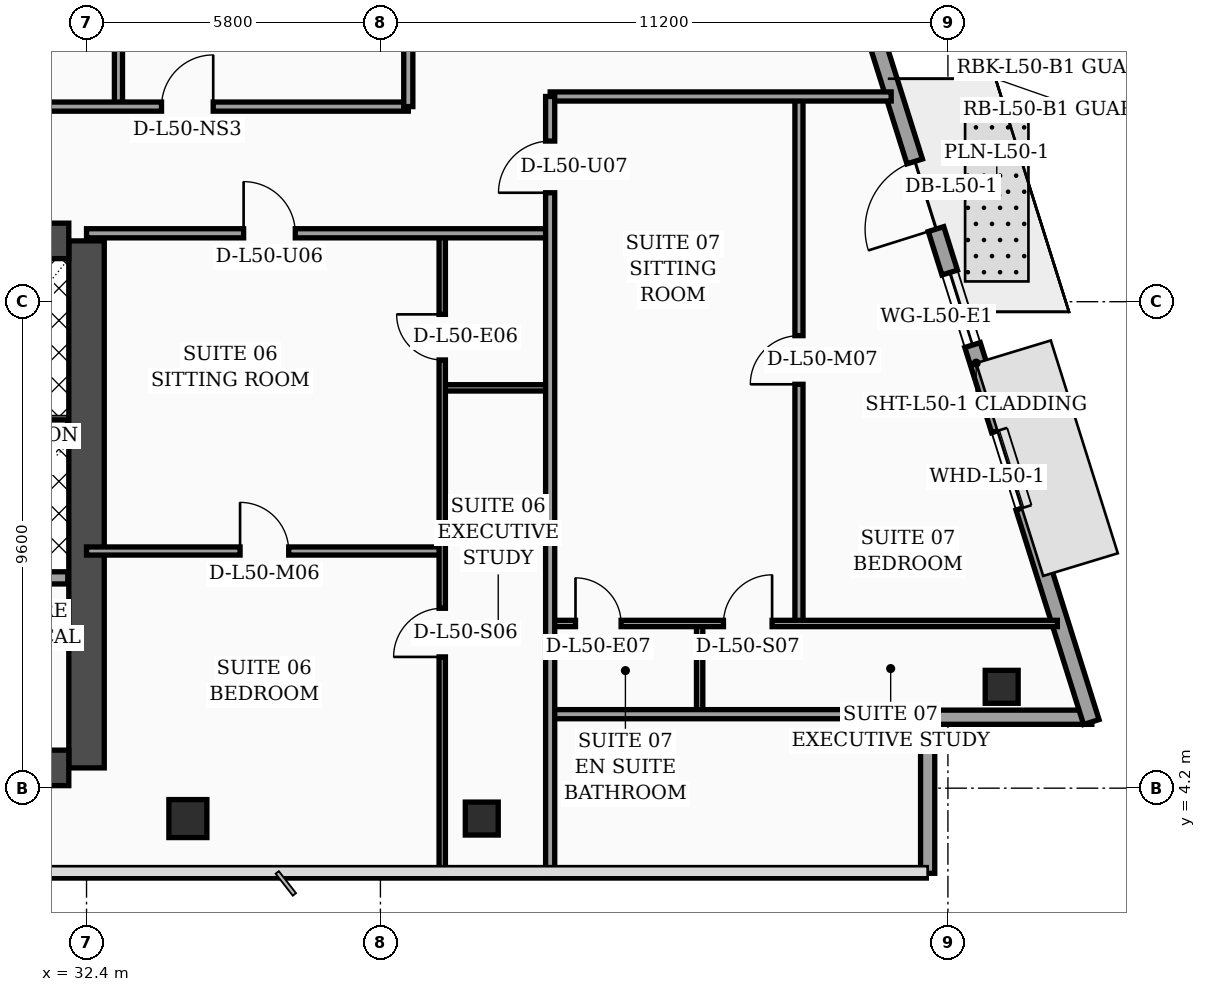
"""IFC4 building model, lengths in metres.
Left out: names, types, materials, properties, quantities, classifications, styles, units other than length and angle.
Written with IfcOpenShell. Run it as: python <this file> out.ifc"""

import sys

from ifc_helpers import new_model, si_unit, direction, frame, frame_2d, origin, origin_2d, place, context, subcontext, project, spatial, rectangle, hollow_rectangle, extrude, element, fill, save


model = new_model("IFC4")
c1 = context("Model", 3, precision=1e-05, world=origin(), true_north=direction((0.0, 1.0)))
c2 = subcontext(c1, "Body", "Model", "MODEL_VIEW")
j1 = project(units=[si_unit("LENGTHUNIT", "METRE"), si_unit("PLANEANGLEUNIT", "RADIAN")], contexts=[c1])
p1 = place(None, origin())
s1 = spatial("IfcSite", under=j1, at=p1, CompositionType="ELEMENT")
p2 = place(p1, origin())
s2 = spatial("IfcBuilding", under=s1, at=p2, CompositionType="ELEMENT")
p3 = place(p2, frame((0.0, 0.0, 203.4)))
s3 = spatial("IfcBuildingStorey", under=s2, at=p3, CompositionType="ELEMENT", Elevation=203.4)
p4 = place(p3, frame((32.4, 4.6, 0.0), z_axis=(0.0, 0.0, 1.0), x_axis=(0.0, 1.0, 0.0)))
e1 = element("IfcWall", 1, at=p4, inside=s3, PredefinedType="SHEAR", context=c2, shape_type="SweptSolid", body=[
    extrude(rectangle(XDim=10.4, YDim=0.7, at=frame_2d((5.2, 0.0))), origin(), (0.0, 0.0, 1.0), 3.56),
])
p5 = place(p3, frame((21.95, 15.0, 0.0), z_axis=(0.0, 0.0, 1.0), x_axis=(1.0, 0.0, 0.0)))
e2 = element("IfcWall", 2, at=p5, inside=s3, PredefinedType="SHEAR", context=c2, shape_type="SweptSolid", body=[
    extrude(rectangle(XDim=10.1, YDim=0.7, at=frame_2d((5.05, 0.0))), origin(), (0.0, 0.0, 1.0), 3.56),
])
p6 = place(p5, frame((4.95, 0.0, 0.0)))
e3 = element("IfcOpeningElement", 3, at=p6, cuts=e2, PredefinedType="OPENING", context=c2, shape_type="SweptSolid", body=[
    extrude(rectangle(XDim=1.1, YDim=2.2, at=frame_2d((0.55, 1.1))), frame((0.0, 0.36, 0.0), z_axis=(0.0, -1.0, 0.0), x_axis=(1.0, 0.0, 0.0)), (0.0, 0.0, 1.0), 0.72),
])
p7 = place(p3, frame((21.95, 4.6, 0.0), z_axis=(0.0, 0.0, 1.0), x_axis=(1.0, 0.0, 0.0)))
e4 = element("IfcWall", 4, at=p7, inside=s3, PredefinedType="SHEAR", context=c2, shape_type="SweptSolid", body=[
    extrude(rectangle(XDim=10.1, YDim=0.7, at=frame_2d((5.05, 0.0))), origin(), (0.0, 0.0, 1.0), 3.56),
])
p8 = place(p3, frame((34.4, 3.6, 0.0), z_axis=(0.0, 0.0, 1.0), x_axis=(1.0, 0.0, 0.0)))
e5 = element("IfcColumn", 5, at=p8, inside=s3, PredefinedType="COLUMN", context=c2, shape_type="SweptSolid", body=[
    extrude(hollow_rectangle(XDim=0.75, YDim=0.75, WallThickness=0.032, at=origin_2d()), origin(), (0.0, 0.0, 1.0), 3.56),
])
for number, where, z_axis, x_axis in (
    (6, (40.2, 3.6, 0.0), (0.0, 0.0, 1.0), (1.0, 0.0, 0.0)),
    (7, (50.461, 6.2, 0.0), (0.0, 0.0, 1.0), (1.0, 0.0, 0.0)),
):
    element("IfcColumn", number, at=place(p3, frame(where, z_axis=z_axis, x_axis=x_axis)), inside=s3, PredefinedType="COLUMN", context=c2, shape_type="SweptSolid", body=[
        extrude(hollow_rectangle(XDim=0.65, YDim=0.65, WallThickness=0.028, at=origin_2d()), origin(), (0.0, 0.0, 1.0), 3.56),
    ])
p9 = place(p3, frame((49.0, 2.52, 0.0), z_axis=(0.0, 0.0, 1.0), x_axis=(0.0, 1.0, 0.0)))
e8 = element("IfcWall", 8, at=p9, inside=s3, PredefinedType="SOLIDWALL", context=c2, shape_type="SweptSolid", body=[
    extrude(rectangle(XDim=2.94, YDim=0.28, at=frame_2d((1.47, 0.0))), origin(), (0.0, 0.0, 1.0), 3.09),
])
p10 = place(p3, frame((48.86, 5.6, 0.0), z_axis=(0.0, 0.0, 1.0), x_axis=(1.0, 0.0, 0.0)))
e9 = element("IfcWall", 9, at=p10, inside=s3, PredefinedType="SOLIDWALL", context=c2, shape_type="SweptSolid", body=[
    extrude(rectangle(XDim=3.38, YDim=0.28, at=frame_2d((1.69, 0.0))), origin(), (0.0, 0.0, 1.0), 3.09),
])
p11 = place(p3, frame((52.23, 5.505, 0.0), z_axis=(0.0, 0.0, 1.0), x_axis=(-0.300509063924, 0.953778958931, 0.0)))
e10 = element("IfcWall", 10, at=p11, inside=s3, PredefinedType="SOLIDWALL", context=c2, shape_type="SweptSolid", body=[
    extrude(rectangle(XDim=30.814, YDim=0.32, at=frame_2d((15.407, 0.0))), origin(), (0.0, 0.0, 1.0), 3.56),
])
p12 = place(p11, frame((10.199, 0.0, 0.0)))
e11 = element("IfcOpeningElement", 11, at=p12, cuts=e10, PredefinedType="OPENING", context=c2, shape_type="SweptSolid", body=[
    extrude(rectangle(XDim=1.4, YDim=2.25, at=frame_2d((0.7, 1.125))), frame((0.0, 0.17, 0.0), z_axis=(0.0, -1.0, 0.0), x_axis=(1.0, 0.0, 0.0)), (0.0, 0.0, 1.0), 0.34),
])
p13 = place(p11, frame((4.437, 0.0, 0.7)))
e12 = element("IfcOpeningElement", 12, at=p13, cuts=e10, PredefinedType="OPENING", context=c2, shape_type="SweptSolid", body=[
    extrude(rectangle(XDim=1.6, YDim=1.65, at=frame_2d((0.8, 0.825))), frame((0.0, 0.17, 0.0), z_axis=(0.0, -1.0, 0.0), x_axis=(1.0, 0.0, 0.0)), (0.0, 0.0, 1.0), 0.34),
])
p14 = place(p11, frame((18.696, 0.0, 0.7)))
e13 = element("IfcOpeningElement", 13, at=p14, cuts=e10, PredefinedType="OPENING", context=c2, shape_type="SweptSolid", body=[
    extrude(rectangle(XDim=1.6, YDim=1.65, at=frame_2d((0.8, 0.825))), frame((0.0, 0.17, 0.0), z_axis=(0.0, -1.0, 0.0), x_axis=(1.0, 0.0, 0.0)), (0.0, 0.0, 1.0), 0.34),
])
p15 = place(p11, frame((7.8, 0.0, 0.75)))
e14 = element("IfcOpeningElement", 14, at=p15, cuts=e10, PredefinedType="OPENING", context=c2, shape_type="SweptSolid", body=[
    extrude(rectangle(XDim=1.5, YDim=1.6, at=frame_2d((0.75, 0.8))), frame((0.0, 0.17, 0.0), z_axis=(0.0, -1.0, 0.0), x_axis=(1.0, 0.0, 0.0)), (0.0, 0.0, 1.0), 0.34),
])
p16 = place(p11, frame((14.0, 0.0, 0.75)))
e15 = element("IfcOpeningElement", 15, at=p16, cuts=e10, PredefinedType="OPENING", context=c2, shape_type="SweptSolid", body=[
    extrude(rectangle(XDim=1.5, YDim=1.6, at=frame_2d((0.75, 0.8))), frame((0.0, 0.17, 0.0), z_axis=(0.0, -1.0, 0.0), x_axis=(1.0, 0.0, 0.0)), (0.0, 0.0, 1.0), 0.34),
])
p17 = place(p11, frame((16.55, 0.0, 0.75)))
e16 = element("IfcOpeningElement", 16, at=p17, cuts=e10, PredefinedType="OPENING", context=c2, shape_type="SweptSolid", body=[
    extrude(rectangle(XDim=1.5, YDim=1.6, at=frame_2d((0.75, 0.8))), frame((0.0, 0.17, 0.0), z_axis=(0.0, -1.0, 0.0), x_axis=(1.0, 0.0, 0.0)), (0.0, 0.0, 1.0), 0.34),
])
p18 = place(p11, frame((20.75, 0.0, 0.75)))
e17 = element("IfcOpeningElement", 17, at=p18, cuts=e10, PredefinedType="OPENING", context=c2, shape_type="SweptSolid", body=[
    extrude(rectangle(XDim=1.5, YDim=1.6, at=frame_2d((0.75, 0.8))), frame((0.0, 0.17, 0.0), z_axis=(0.0, -1.0, 0.0), x_axis=(1.0, 0.0, 0.0)), (0.0, 0.0, 1.0), 0.34),
])
p19 = place(p11, frame((23.3, 0.0, 0.75)))
e18 = element("IfcOpeningElement", 18, at=p19, cuts=e10, PredefinedType="OPENING", context=c2, shape_type="SweptSolid", body=[
    extrude(rectangle(XDim=1.5, YDim=1.6, at=frame_2d((0.75, 0.8))), frame((0.0, 0.17, 0.0), z_axis=(0.0, -1.0, 0.0), x_axis=(1.0, 0.0, 0.0)), (0.0, 0.0, 1.0), 0.34),
])
p20 = place(p11, frame((26.4, 0.0, 0.75)))
e19 = element("IfcOpeningElement", 19, at=p20, cuts=e10, PredefinedType="OPENING", context=c2, shape_type="SweptSolid", body=[
    extrude(rectangle(XDim=1.5, YDim=1.6, at=frame_2d((0.75, 0.8))), frame((0.0, 0.17, 0.0), z_axis=(0.0, -1.0, 0.0), x_axis=(1.0, 0.0, 0.0)), (0.0, 0.0, 1.0), 0.34),
])
p21 = place(p3, frame((27.02, 11.35, 0.0), z_axis=(0.0, 0.0, 1.0), x_axis=(1.0, 0.0, 0.0)))
e20 = element("IfcWall", 20, at=p21, inside=s3, PredefinedType="SOLIDWALL", context=c2, shape_type="SweptSolid", body=[
    extrude(rectangle(XDim=5.01, YDim=0.24, at=frame_2d((2.505, 0.0))), origin(), (0.0, 0.0, 1.0), 3.56),
])
p22 = place(p21, frame((0.45, 0.0, 0.0)))
e21 = element("IfcOpeningElement", 21, at=p22, cuts=e20, PredefinedType="OPENING", context=c2, shape_type="SweptSolid", body=[
    extrude(rectangle(XDim=1.3, YDim=2.35, at=frame_2d((0.65, 1.175))), frame((0.0, 0.13, 0.0), z_axis=(0.0, -1.0, 0.0), x_axis=(1.0, 0.0, 0.0)), (0.0, 0.0, 1.0), 0.26),
])
p23 = place(p3, frame((27.02, 8.35, 0.0), z_axis=(0.0, 0.0, 1.0), x_axis=(1.0, 0.0, 0.0)))
e22 = element("IfcWall", 22, at=p23, inside=s3, PredefinedType="SOLIDWALL", context=c2, shape_type="SweptSolid", body=[
    extrude(rectangle(XDim=5.01, YDim=0.24, at=frame_2d((2.505, 0.0))), origin(), (0.0, 0.0, 1.0), 3.56),
])
p24 = place(p3, frame((39.42, 12.1, 0.0), z_axis=(0.0, 0.0, 1.0), x_axis=(1.0, 0.0, 0.0)))
e23 = element("IfcWall", 23, at=p24, inside=s3, PredefinedType="PARTITIONING", context=c2, shape_type="SweptSolid", body=[
    extrude(rectangle(XDim=2.13, YDim=0.125, at=frame_2d((1.065, 0.0))), origin(), (0.0, 0.0, 1.0), 3.56),
])
p25 = place(p3, frame((32.4, 8.88, 0.0), z_axis=(0.0, 0.0, 1.0), x_axis=(1.0, 0.0, 0.0)))
e24 = element("IfcWall", 24, at=p25, inside=s3, PredefinedType="PARTITIONING", context=c2, shape_type="SweptSolid", body=[
    extrude(rectangle(XDim=7.02, YDim=0.16, at=frame_2d((3.51, 0.0))), origin(), (0.0, 0.0, 1.0), 2.94),
])
p26 = place(p25, frame((3.03, 0.0, 0.0)))
e25 = element("IfcOpeningElement", 25, at=p26, cuts=e24, PredefinedType="OPENING", context=c2, shape_type="SweptSolid", body=[
    extrude(rectangle(XDim=0.96, YDim=2.2, at=frame_2d((0.48, 1.1))), frame((0.0, 0.09, 0.0), z_axis=(0.0, -1.0, 0.0), x_axis=(1.0, 0.0, 0.0)), (0.0, 0.0, 1.0), 0.18),
])
p27 = place(p3, frame((39.42, 2.44, 0.0), z_axis=(0.0, 0.0, 1.0), x_axis=(0.0, 1.0, 0.0)))
e26 = element("IfcWall", 26, at=p27, inside=s3, PredefinedType="PARTITIONING", context=c2, shape_type="SweptSolid", body=[
    extrude(rectangle(XDim=12.71, YDim=0.125, at=frame_2d((6.355, 0.0))), origin(), (0.0, 0.0, 1.0), 2.94),
])
p28 = place(p27, frame((4.35, 0.0, 0.0)))
e27 = element("IfcOpeningElement", 27, at=p28, cuts=e26, PredefinedType="OPENING", context=c2, shape_type="SweptSolid", body=[
    extrude(rectangle(XDim=0.96, YDim=2.2, at=frame_2d((0.48, 1.1))), frame((0.0, 0.073, 0.0), z_axis=(0.0, -1.0, 0.0), x_axis=(1.0, 0.0, 0.0)), (0.0, 0.0, 1.0), 0.145),
])
p29 = place(p27, frame((10.21, 0.0, 0.0)))
e28 = element("IfcOpeningElement", 28, at=p29, cuts=e26, PredefinedType="OPENING", context=c2, shape_type="SweptSolid", body=[
    extrude(rectangle(XDim=0.9, YDim=2.15, at=frame_2d((0.45, 1.075))), frame((0.0, 0.073, 0.0), z_axis=(0.0, -1.0, 0.0), x_axis=(1.0, 0.0, 0.0)), (0.0, 0.0, 1.0), 0.145),
])
p30 = place(p3, frame((32.4, 15.15, 0.0), z_axis=(0.0, 0.0, 1.0), x_axis=(1.0, 0.0, 0.0)))
e29 = element("IfcWall", 29, at=p30, inside=s3, PredefinedType="PARTITIONING", context=c2, shape_type="SweptSolid", body=[
    extrude(rectangle(XDim=9.15, YDim=0.18, at=frame_2d((4.575, 0.0))), origin(), (0.0, 0.0, 1.0), 2.94),
])
p31 = place(p30, frame((3.1, 0.0, 0.0)))
e30 = element("IfcOpeningElement", 30, at=p31, cuts=e29, PredefinedType="OPENING", context=c2, shape_type="SweptSolid", body=[
    extrude(rectangle(XDim=1.02, YDim=2.2, at=frame_2d((0.51, 1.1))), frame((0.0, 0.1, 0.0), z_axis=(0.0, -1.0, 0.0), x_axis=(1.0, 0.0, 0.0)), (0.0, 0.0, 1.0), 0.2),
])
p32 = place(p3, frame((33.03, 17.65, 0.0), z_axis=(0.0, 0.0, 1.0), x_axis=(0.0, 1.0, 0.0)))
e31 = element("IfcWall", 31, at=p32, inside=s3, PredefinedType="PARTITIONING", context=c2, shape_type="SweptSolid", body=[
    extrude(rectangle(XDim=15.76, YDim=0.16, at=frame_2d((7.88, 0.0))), origin(), (0.0, 0.0, 1.0), 2.94),
])
p33 = place(p3, frame((21.5, 17.65, 0.0), z_axis=(0.0, 0.0, 1.0), x_axis=(1.0, 0.0, 0.0)))
e32 = element("IfcWall", 32, at=p33, inside=s3, PredefinedType="PARTITIONING", context=c2, shape_type="SweptSolid", body=[
    extrude(rectangle(XDim=17.25, YDim=0.18, at=frame_2d((8.625, 0.0))), origin(), (0.0, 0.0, 1.0), 2.94),
])
p34 = place(p33, frame((0.95, 0.0, 0.0)))
e33 = element("IfcOpeningElement", 33, at=p34, cuts=e32, PredefinedType="OPENING", context=c2, shape_type="SweptSolid", body=[
    extrude(rectangle(XDim=1.02, YDim=2.2, at=frame_2d((0.51, 1.1))), frame((0.0, 0.1, 0.0), z_axis=(0.0, -1.0, 0.0), x_axis=(1.0, 0.0, 0.0)), (0.0, 0.0, 1.0), 0.2),
])
p35 = place(p33, frame((6.67, 0.0, 0.0)))
e34 = element("IfcOpeningElement", 34, at=p35, cuts=e32, PredefinedType="OPENING", context=c2, shape_type="SweptSolid", body=[
    extrude(rectangle(XDim=1.02, YDim=2.2, at=frame_2d((0.51, 1.1))), frame((0.0, 0.1, 0.0), z_axis=(0.0, -1.0, 0.0), x_axis=(1.0, 0.0, 0.0)), (0.0, 0.0, 1.0), 0.2),
])
p36 = place(p33, frame((12.38, 0.0, 0.0)))
e35 = element("IfcOpeningElement", 35, at=p36, cuts=e32, PredefinedType="OPENING", context=c2, shape_type="SweptSolid", body=[
    extrude(rectangle(XDim=1.02, YDim=2.2, at=frame_2d((0.51, 1.1))), frame((0.0, 0.1, 0.0), z_axis=(0.0, -1.0, 0.0), x_axis=(1.0, 0.0, 0.0)), (0.0, 0.0, 1.0), 0.2),
])
p37 = place(p3, frame((38.75, 17.65, 0.0), z_axis=(0.0, 0.0, 1.0), x_axis=(0.0, 1.0, 0.0)))
e36 = element("IfcWall", 36, at=p37, inside=s3, PredefinedType="PARTITIONING", context=c2, shape_type="SweptSolid", body=[
    extrude(rectangle(XDim=20.23, YDim=0.18, at=frame_2d((10.115, 0.0))), origin(), (0.0, 0.0, 1.0), 2.94),
])
p38 = place(p3, frame((44.5, 5.66, 0.0), z_axis=(0.0, 0.0, 1.0), x_axis=(0.0, 1.0, 0.0)))
e37 = element("IfcWall", 37, at=p38, inside=s3, PredefinedType="PARTITIONING", context=c2, shape_type="SweptSolid", body=[
    extrude(rectangle(XDim=1.79, YDim=0.125, at=frame_2d((0.895, 0.0))), origin(), (0.0, 0.0, 1.0), 3.56),
])
p39 = place(p3, frame((46.46, 7.45, 0.0), z_axis=(0.0, 0.0, 1.0), x_axis=(0.0, 1.0, 0.0)))
e38 = element("IfcWall", 38, at=p39, inside=s3, PredefinedType="PARTITIONING", context=c2, shape_type="SweptSolid", body=[
    extrude(rectangle(XDim=10.4, YDim=0.16, at=frame_2d((5.2, 0.0))), origin(), (0.0, 0.0, 1.0), 3.09),
])
p40 = place(p39, frame((4.72, 0.0, 0.0)))
e39 = element("IfcOpeningElement", 39, at=p40, cuts=e38, PredefinedType="OPENING", context=c2, shape_type="SweptSolid", body=[
    extrude(rectangle(XDim=0.96, YDim=2.2, at=frame_2d((0.48, 1.1))), frame((0.0, 0.09, 0.0), z_axis=(0.0, -1.0, 0.0), x_axis=(1.0, 0.0, 0.0)), (0.0, 0.0, 1.0), 0.18),
])
p41 = place(p3, frame((41.55, 7.45, 0.0), z_axis=(0.0, 0.0, 1.0), x_axis=(1.0, 0.0, 0.0)))
e40 = element("IfcWall", 40, at=p41, inside=s3, PredefinedType="PARTITIONING", context=c2, shape_type="SweptSolid", body=[
    extrude(rectangle(XDim=10.01, YDim=0.125, at=frame_2d((5.005, 0.0))), origin(), (0.0, 0.0, 1.0), 3.09),
])
p42 = place(p41, frame((0.5, 0.0, 0.0)))
e41 = element("IfcOpeningElement", 41, at=p42, cuts=e40, PredefinedType="OPENING", context=c2, shape_type="SweptSolid", body=[
    extrude(rectangle(XDim=0.9, YDim=2.15, at=frame_2d((0.45, 1.075))), frame((0.0, 0.073, 0.0), z_axis=(0.0, -1.0, 0.0), x_axis=(1.0, 0.0, 0.0)), (0.0, 0.0, 1.0), 0.145),
])
p43 = place(p41, frame((3.42, 0.0, 0.0)))
e42 = element("IfcOpeningElement", 42, at=p43, cuts=e40, PredefinedType="OPENING", context=c2, shape_type="SweptSolid", body=[
    extrude(rectangle(XDim=0.96, YDim=2.2, at=frame_2d((0.48, 1.1))), frame((0.0, 0.073, 0.0), z_axis=(0.0, -1.0, 0.0), x_axis=(1.0, 0.0, 0.0)), (0.0, 0.0, 1.0), 0.145),
])
p44 = place(p3, frame((41.55, 5.66, 0.0), z_axis=(0.0, 0.0, 1.0), x_axis=(1.0, 0.0, 0.0)))
e43 = element("IfcWall", 43, at=p44, inside=s3, PredefinedType="PARTITIONING", context=c2, shape_type="SweptSolid", body=[
    extrude(rectangle(XDim=7.45, YDim=0.18, at=frame_2d((3.725, 0.0))), origin(), (0.0, 0.0, 1.0), 3.09),
])
p45 = place(p3, frame((41.55, 17.85, 0.0), z_axis=(0.0, 0.0, 1.0), x_axis=(1.0, 0.0, 0.0)))
e44 = element("IfcWall", 44, at=p45, inside=s3, PredefinedType="PARTITIONING", context=c2, shape_type="SweptSolid", body=[
    extrude(rectangle(XDim=6.73, YDim=0.18, at=frame_2d((3.365, 0.0))), origin(), (0.0, 0.0, 1.0), 2.94),
])
p46 = place(p3, frame((41.55, 2.44, 0.0), z_axis=(0.0, 0.0, 1.0), x_axis=(0.0, 1.0, 0.0)))
e45 = element("IfcWall", 45, at=p46, inside=s3, PredefinedType="PARTITIONING", context=c2, shape_type="SweptSolid", body=[
    extrude(rectangle(XDim=15.41, YDim=0.18, at=frame_2d((7.705, 0.0))), origin(), (0.0, 0.0, 1.0), 2.94),
])
p47 = place(p46, frame((13.51, 0.0, 0.0)))
e46 = element("IfcOpeningElement", 46, at=p47, cuts=e45, PredefinedType="OPENING", context=c2, shape_type="SweptSolid", body=[
    extrude(rectangle(XDim=1.02, YDim=2.2, at=frame_2d((0.51, 1.1))), frame((0.0, 0.1, 0.0), z_axis=(0.0, -1.0, 0.0), x_axis=(1.0, 0.0, 0.0)), (0.0, 0.0, 1.0), 0.2),
])
p48 = place(p12, origin())
e47 = element("IfcDoor", 47, at=p48, inside=s3, OperationType="SINGLE_SWING_LEFT", PredefinedType="DOOR", context=c2, shape_type="SweptSolid", body=[
    extrude(rectangle(XDim=1.4, YDim=2.25, at=frame_2d((0.7, 1.125))), frame((0.0, 0.025, 0.0), z_axis=(0.0, -1.0, 0.0), x_axis=(1.0, 0.0, 0.0)), (0.0, 0.0, 1.0), 0.05),
])
fill(e11, e47)
p49 = place(p13, origin())
e48 = element("IfcWindow", 48, at=p49, inside=s3, PartitioningType="SINGLE_PANEL", PredefinedType="WINDOW", context=c2, shape_type="SweptSolid", body=[
    extrude(rectangle(XDim=1.6, YDim=1.65, at=frame_2d((0.8, 0.825))), frame((0.0, 0.03, 0.0), z_axis=(0.0, -1.0, 0.0), x_axis=(1.0, 0.0, 0.0)), (0.0, 0.0, 1.0), 0.06),
])
fill(e12, e48)
p50 = place(p15, origin())
e49 = element("IfcWindow", 49, at=p50, inside=s3, PartitioningType="SINGLE_PANEL", PredefinedType="WINDOW", context=c2, shape_type="SweptSolid", body=[
    extrude(rectangle(XDim=1.5, YDim=1.6, at=frame_2d((0.75, 0.8))), frame((0.0, 0.03, 0.0), z_axis=(0.0, -1.0, 0.0), x_axis=(1.0, 0.0, 0.0)), (0.0, 0.0, 1.0), 0.06),
])
fill(e14, e49)
p51 = place(p26, origin())
e50 = element("IfcDoor", 50, at=p51, inside=s3, OperationType="SINGLE_SWING_LEFT", PredefinedType="DOOR", context=c2, shape_type="SweptSolid", body=[
    extrude(rectangle(XDim=0.96, YDim=2.2, at=frame_2d((0.48, 1.1))), frame((0.0, 0.025, 0.0), z_axis=(0.0, -1.0, 0.0), x_axis=(1.0, 0.0, 0.0)), (0.0, 0.0, 1.0), 0.05),
])
fill(e25, e50)
p52 = place(p28, origin())
e51 = element("IfcDoor", 51, at=p52, inside=s3, OperationType="SINGLE_SWING_LEFT", PredefinedType="DOOR", context=c2, shape_type="SweptSolid", body=[
    extrude(rectangle(XDim=0.96, YDim=2.2, at=frame_2d((0.48, 1.1))), frame((0.0, 0.025, 0.0), z_axis=(0.0, -1.0, 0.0), x_axis=(1.0, 0.0, 0.0)), (0.0, 0.0, 1.0), 0.05),
])
fill(e27, e51)
p53 = place(p29, origin())
e52 = element("IfcDoor", 52, at=p53, inside=s3, OperationType="SINGLE_SWING_RIGHT", PredefinedType="DOOR", context=c2, shape_type="SweptSolid", body=[
    extrude(rectangle(XDim=0.9, YDim=2.15, at=frame_2d((0.45, 1.075))), frame((0.0, 0.025, 0.0), z_axis=(0.0, -1.0, 0.0), x_axis=(1.0, 0.0, 0.0)), (0.0, 0.0, 1.0), 0.05),
])
fill(e28, e52)
p54 = place(p31, origin())
e53 = element("IfcDoor", 53, at=p54, inside=s3, OperationType="SINGLE_SWING_LEFT", PredefinedType="DOOR", context=c2, shape_type="SweptSolid", body=[
    extrude(rectangle(XDim=1.02, YDim=2.2, at=frame_2d((0.51, 1.1))), frame((0.0, 0.025, 0.0), z_axis=(0.0, -1.0, 0.0), x_axis=(1.0, 0.0, 0.0)), (0.0, 0.0, 1.0), 0.05),
])
fill(e30, e53)
p55 = place(p36, origin())
e54 = element("IfcDoor", 54, at=p55, inside=s3, OperationType="SINGLE_SWING_RIGHT", PredefinedType="DOOR", context=c2, shape_type="SweptSolid", body=[
    extrude(rectangle(XDim=1.02, YDim=2.2, at=frame_2d((0.51, 1.1))), frame((0.0, 0.025, 0.0), z_axis=(0.0, -1.0, 0.0), x_axis=(1.0, 0.0, 0.0)), (0.0, 0.0, 1.0), 0.05),
])
fill(e35, e54)
p56 = place(p40, origin())
e55 = element("IfcDoor", 55, at=p56, inside=s3, OperationType="SINGLE_SWING_LEFT", PredefinedType="DOOR", context=c2, shape_type="SweptSolid", body=[
    extrude(rectangle(XDim=0.96, YDim=2.2, at=frame_2d((0.48, 1.1))), frame((0.0, 0.025, 0.0), z_axis=(0.0, -1.0, 0.0), x_axis=(1.0, 0.0, 0.0)), (0.0, 0.0, 1.0), 0.05),
])
fill(e39, e55)
p57 = place(p42, origin())
e56 = element("IfcDoor", 56, at=p57, inside=s3, OperationType="SINGLE_SWING_LEFT", PredefinedType="DOOR", context=c2, shape_type="SweptSolid", body=[
    extrude(rectangle(XDim=0.9, YDim=2.15, at=frame_2d((0.45, 1.075))), frame((0.0, 0.025, 0.0), z_axis=(0.0, -1.0, 0.0), x_axis=(1.0, 0.0, 0.0)), (0.0, 0.0, 1.0), 0.05),
])
fill(e41, e56)
p58 = place(p43, origin())
e57 = element("IfcDoor", 57, at=p58, inside=s3, OperationType="SINGLE_SWING_RIGHT", PredefinedType="DOOR", context=c2, shape_type="SweptSolid", body=[
    extrude(rectangle(XDim=0.96, YDim=2.2, at=frame_2d((0.48, 1.1))), frame((0.0, 0.025, 0.0), z_axis=(0.0, -1.0, 0.0), x_axis=(1.0, 0.0, 0.0)), (0.0, 0.0, 1.0), 0.05),
])
fill(e42, e57)
p59 = place(p47, origin())
e58 = element("IfcDoor", 58, at=p59, inside=s3, OperationType="SINGLE_SWING_LEFT", PredefinedType="DOOR", context=c2, shape_type="SweptSolid", body=[
    extrude(rectangle(XDim=1.02, YDim=2.2, at=frame_2d((0.51, 1.1))), frame((0.0, 0.025, 0.0), z_axis=(0.0, -1.0, 0.0), x_axis=(1.0, 0.0, 0.0)), (0.0, 0.0, 1.0), 0.05),
])
fill(e46, e58)
save(model, sys.argv[1])
